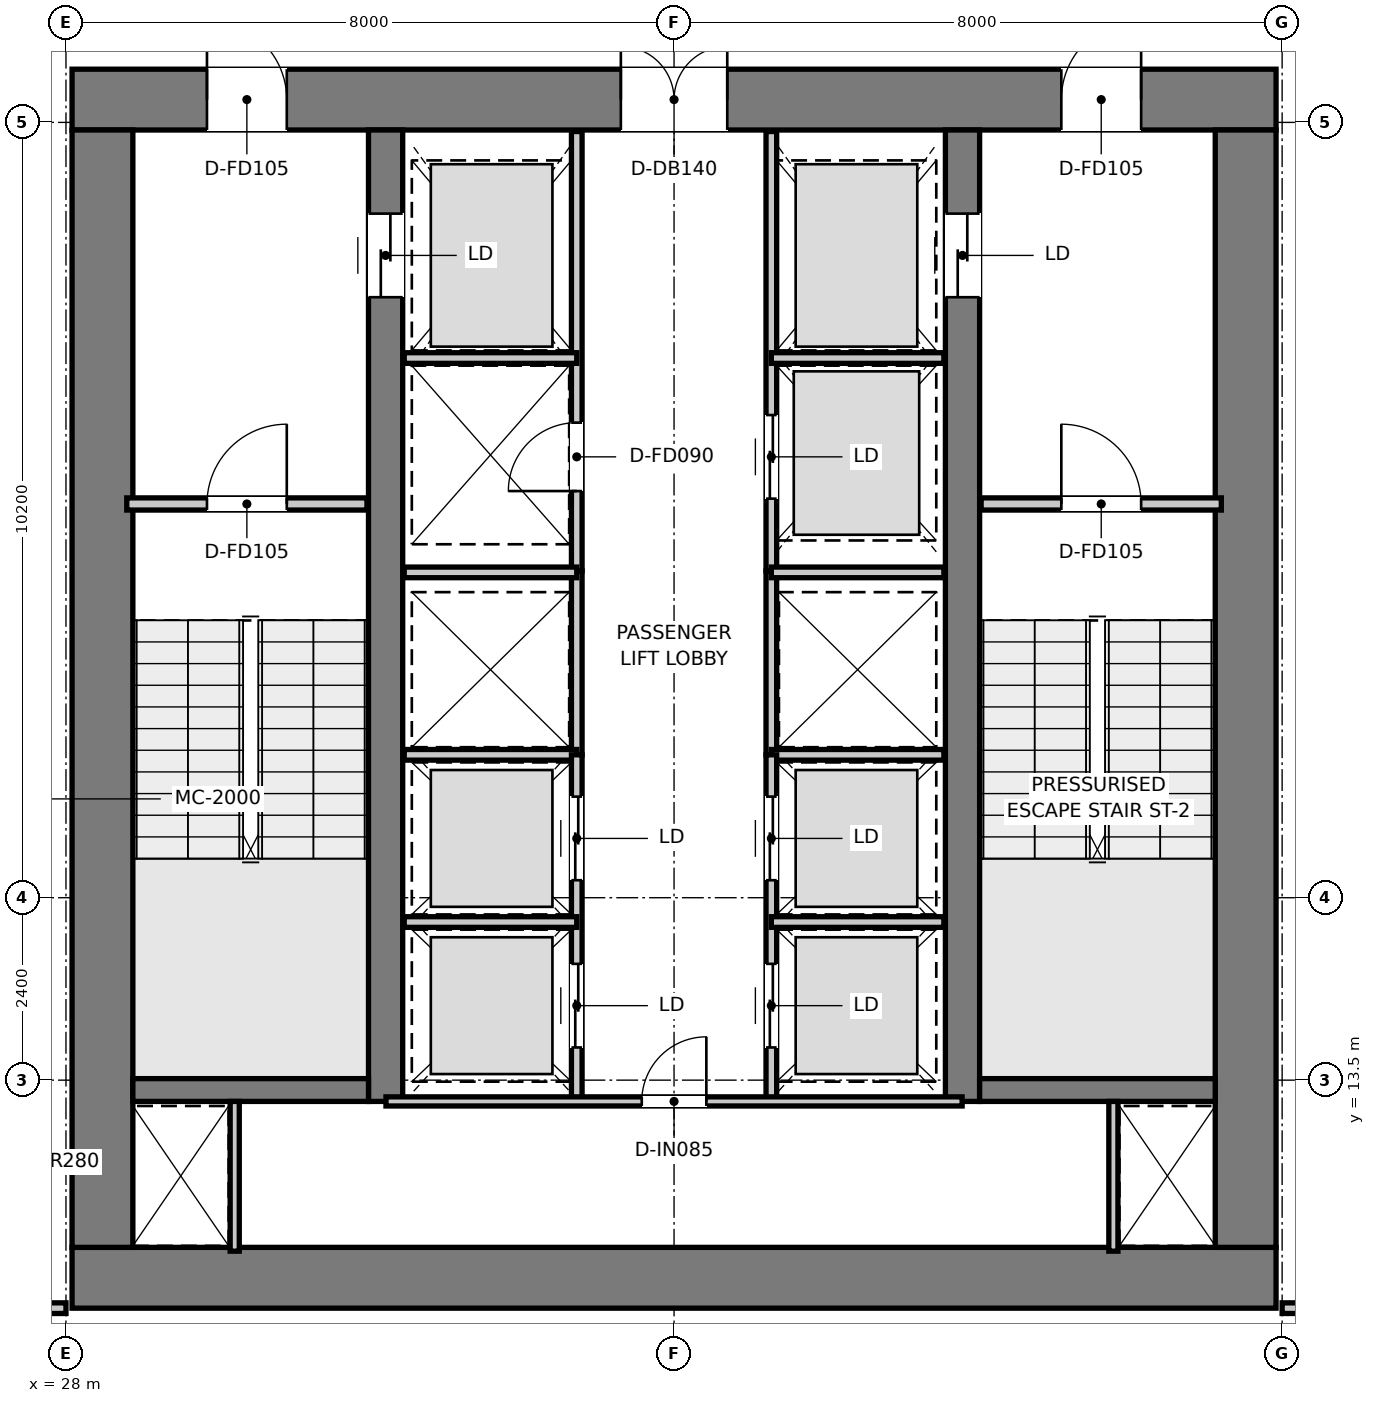
"""IFC4 building model, lengths in metres.
Left out: names, types, materials, properties, quantities, classifications, styles, units other than length and angle.
Written with IfcOpenShell. Run it as: python <this file> out.ifc"""

import sys

from ifc_helpers import new_model, si_unit, direction, frame, frame_2d, origin, place, context, subcontext, project, spatial, rectangle, extrude, element, fill, save


model = new_model("IFC4")
c1 = context("Model", 3, precision=1e-05, world=origin(), true_north=direction((0.0, 1.0)))
c2 = subcontext(c1, "Body", "Model", "MODEL_VIEW")
j1 = project(units=[si_unit("LENGTHUNIT", "METRE"), si_unit("PLANEANGLEUNIT", "RADIAN")], contexts=[c1])
p1 = place(None, origin())
s1 = spatial("IfcSite", under=j1, at=p1, CompositionType="ELEMENT")
p2 = place(p1, origin())
s2 = spatial("IfcBuilding", under=s1, at=p2, CompositionType="ELEMENT")
p3 = place(p2, frame((0.0, 0.0, 86.1)))
s3 = spatial("IfcBuildingStorey", under=s2, at=p3, CompositionType="ELEMENT", Elevation=86.1)
p4 = place(p3, frame((28.08, 10.9, 0.0), z_axis=(0.0, 0.0, 1.0), x_axis=(1.0, 0.0, 0.0)))
e1 = element("IfcWall", 1, at=p4, inside=s3, PredefinedType="SHEAR", context=c2, shape_type="SweptSolid", body=[
    extrude(rectangle(XDim=15.84, YDim=0.8, at=frame_2d((7.92, 0.0))), origin(), (0.0, 0.0, 1.0), 3.95),
])
p5 = place(p3, frame((28.08, 26.4, 0.0), z_axis=(0.0, 0.0, 1.0), x_axis=(1.0, 0.0, 0.0)))
e2 = element("IfcWall", 2, at=p5, inside=s3, PredefinedType="SHEAR", context=c2, shape_type="SweptSolid", body=[
    extrude(rectangle(XDim=15.84, YDim=0.8, at=frame_2d((7.92, 0.0))), origin(), (0.0, 0.0, 1.0), 3.95),
])
p6 = place(p5, frame((7.22, 0.0, 0.0)))
e3 = element("IfcOpeningElement", 3, at=p6, cuts=e2, PredefinedType="OPENING", context=c2, shape_type="SweptSolid", body=[
    extrude(rectangle(XDim=1.4, YDim=2.2, at=frame_2d((0.7, 1.1))), frame((0.0, 0.41, 0.0), z_axis=(0.0, -1.0, 0.0), x_axis=(1.0, 0.0, 0.0)), (0.0, 0.0, 1.0), 0.82),
])
p7 = place(p5, frame((1.775, 0.0, 0.0)))
e4 = element("IfcOpeningElement", 4, at=p7, cuts=e2, PredefinedType="OPENING", context=c2, shape_type="SweptSolid", body=[
    extrude(rectangle(XDim=1.05, YDim=2.1, at=frame_2d((0.525, 1.05))), frame((0.0, 0.41, 0.0), z_axis=(0.0, -1.0, 0.0), x_axis=(1.0, 0.0, 0.0)), (0.0, 0.0, 1.0), 0.82),
])
p8 = place(p5, frame((13.015, 0.0, 0.0)))
e5 = element("IfcOpeningElement", 5, at=p8, cuts=e2, PredefinedType="OPENING", context=c2, shape_type="SweptSolid", body=[
    extrude(rectangle(XDim=1.05, YDim=2.1, at=frame_2d((0.525, 1.05))), frame((0.0, 0.41, 0.0), z_axis=(0.0, -1.0, 0.0), x_axis=(1.0, 0.0, 0.0)), (0.0, 0.0, 1.0), 0.82),
])
for number, where, z_axis, x_axis in (
    (6, (28.48, 11.3, 0.0), (0.0, 0.0, 1.0), (0.0, 1.0, 0.0)),
    (7, (43.52, 11.3, 0.0), (0.0, 0.0, 1.0), (0.0, 1.0, 0.0)),
):
    element("IfcWall", number, at=place(p3, frame(where, z_axis=z_axis, x_axis=x_axis)), inside=s3, PredefinedType="SHEAR", context=c2, shape_type="SweptSolid", body=[
        extrude(rectangle(XDim=14.7, YDim=0.8, at=frame_2d((7.35, 0.0))), origin(), (0.0, 0.0, 1.0), 3.95),
    ])
p9 = place(p3, frame((32.205, 13.22, 0.0), z_axis=(0.0, 0.0, 1.0), x_axis=(0.0, 1.0, 0.0)))
e8 = element("IfcWall", 8, at=p9, inside=s3, PredefinedType="SHEAR", context=c2, shape_type="SweptSolid", body=[
    extrude(rectangle(XDim=12.78, YDim=0.45, at=frame_2d((6.39, 0.0))), origin(), (0.0, 0.0, 1.0), 3.95),
])
p10 = place(p9, frame((10.58, 0.0, 0.0)))
e9 = element("IfcOpeningElement", 9, at=p10, cuts=e8, PredefinedType="OPENING", context=c2, shape_type="SweptSolid", body=[
    extrude(rectangle(XDim=1.1, YDim=2.15, at=frame_2d((0.55, 1.075))), frame((0.0, 0.235, 0.0), z_axis=(0.0, -1.0, 0.0), x_axis=(1.0, 0.0, 0.0)), (0.0, 0.0, 1.0), 0.47),
])
p11 = place(p3, frame((39.795, 13.22, 0.0), z_axis=(0.0, 0.0, 1.0), x_axis=(0.0, 1.0, 0.0)))
e10 = element("IfcWall", 10, at=p11, inside=s3, PredefinedType="SHEAR", context=c2, shape_type="SweptSolid", body=[
    extrude(rectangle(XDim=12.78, YDim=0.45, at=frame_2d((6.39, 0.0))), origin(), (0.0, 0.0, 1.0), 3.95),
])
p12 = place(p11, frame((10.58, 0.0, 0.0)))
e11 = element("IfcOpeningElement", 11, at=p12, cuts=e10, PredefinedType="OPENING", context=c2, shape_type="SweptSolid", body=[
    extrude(rectangle(XDim=1.1, YDim=2.15, at=frame_2d((0.55, 1.075))), frame((0.0, 0.235, 0.0), z_axis=(0.0, -1.0, 0.0), x_axis=(1.0, 0.0, 0.0)), (0.0, 0.0, 1.0), 0.47),
])
for number, where, z_axis, x_axis in (
    (12, (28.88, 13.37, 0.0), (0.0, 0.0, 1.0), (1.0, 0.0, 0.0)),
    (13, (40.02, 13.37, 0.0), (0.0, 0.0, 1.0), (1.0, 0.0, 0.0)),
):
    element("IfcWall", number, at=place(p3, frame(where, z_axis=z_axis, x_axis=x_axis)), inside=s3, PredefinedType="SHEAR", context=c2, shape_type="SweptSolid", body=[
        extrude(rectangle(XDim=3.1, YDim=0.3, at=frame_2d((1.55, 0.0))), origin(), (0.0, 0.0, 1.0), 3.95),
    ])
p13 = place(p3, frame((28.8, 21.08, 0.0), z_axis=(0.0, 0.0, 1.0), x_axis=(1.0, 0.0, 0.0)))
e14 = element("IfcWall", 14, at=p13, inside=s3, PredefinedType="PARTITIONING", context=c2, shape_type="SweptSolid", body=[
    extrude(rectangle(XDim=3.16, YDim=0.16, at=frame_2d((1.58, 0.0))), origin(), (0.0, 0.0, 1.0), 3.67),
])
p14 = place(p13, frame((1.055, 0.0, 0.0)))
e15 = element("IfcOpeningElement", 15, at=p14, cuts=e14, PredefinedType="OPENING", context=c2, shape_type="SweptSolid", body=[
    extrude(rectangle(XDim=1.05, YDim=2.1, at=frame_2d((0.525, 1.05))), frame((0.0, 0.09, 0.0), z_axis=(0.0, -1.0, 0.0), x_axis=(1.0, 0.0, 0.0)), (0.0, 0.0, 1.0), 0.18),
])
p15 = place(p3, frame((40.04, 21.08, 0.0), z_axis=(0.0, 0.0, 1.0), x_axis=(1.0, 0.0, 0.0)))
e16 = element("IfcWall", 16, at=p15, inside=s3, PredefinedType="PARTITIONING", context=c2, shape_type="SweptSolid", body=[
    extrude(rectangle(XDim=3.16, YDim=0.16, at=frame_2d((1.58, 0.0))), origin(), (0.0, 0.0, 1.0), 3.67),
])
p16 = place(p15, frame((1.055, 0.0, 0.0)))
e17 = element("IfcOpeningElement", 17, at=p16, cuts=e16, PredefinedType="OPENING", context=c2, shape_type="SweptSolid", body=[
    extrude(rectangle(XDim=1.05, YDim=2.1, at=frame_2d((0.525, 1.05))), frame((0.0, 0.09, 0.0), z_axis=(0.0, -1.0, 0.0), x_axis=(1.0, 0.0, 0.0)), (0.0, 0.0, 1.0), 0.18),
])
p17 = place(p3, frame((34.72, 20.2, 0.0), z_axis=(0.0, 0.0, 1.0), x_axis=(0.0, 1.0, 0.0)))
e18 = element("IfcWall", 18, at=p17, inside=s3, PredefinedType="PARTITIONING", context=c2, shape_type="SweptSolid", body=[
    extrude(rectangle(XDim=5.78, YDim=0.14, at=frame_2d((2.89, 0.0))), origin(), (0.0, 0.0, 1.0), 2.47),
])
p18 = place(p17, frame((1.05, 0.0, 0.0)))
e19 = element("IfcOpeningElement", 19, at=p18, cuts=e18, PredefinedType="OPENING", context=c2, shape_type="SweptSolid", body=[
    extrude(rectangle(XDim=0.9, YDim=2.1, at=frame_2d((0.45, 1.05))), frame((0.0, 0.08, 0.0), z_axis=(0.0, -1.0, 0.0), x_axis=(1.0, 0.0, 0.0)), (0.0, 0.0, 1.0), 0.16),
])
p19 = place(p3, frame((37.28, 20.2, 0.0), z_axis=(0.0, 0.0, 1.0), x_axis=(0.0, 1.0, 0.0)))
e20 = element("IfcWall", 20, at=p19, inside=s3, PredefinedType="PARTITIONING", context=c2, shape_type="SweptSolid", body=[
    extrude(rectangle(XDim=5.78, YDim=0.14, at=frame_2d((2.89, 0.0))), origin(), (0.0, 0.0, 1.0), 2.47),
])
p20 = place(p19, frame((0.95, 0.0, 0.0)))
e21 = element("IfcOpeningElement", 21, at=p20, cuts=e20, PredefinedType="OPENING", context=c2, shape_type="SweptSolid", body=[
    extrude(rectangle(XDim=1.1, YDim=2.15, at=frame_2d((0.55, 1.075))), frame((0.0, 0.08, 0.0), z_axis=(0.0, -1.0, 0.0), x_axis=(1.0, 0.0, 0.0)), (0.0, 0.0, 1.0), 0.16),
])
for number, where, z_axis, x_axis in (
    (22, (32.45, 23.0, 0.0), (0.0, 0.0, 1.0), (1.0, 0.0, 0.0)),
    (23, (37.28, 23.0, 0.0), (0.0, 0.0, 1.0), (1.0, 0.0, 0.0)),
):
    element("IfcWall", number, at=place(p3, frame(where, z_axis=z_axis, x_axis=x_axis)), inside=s3, PredefinedType="PARTITIONING", context=c2, shape_type="SweptSolid", body=[
        extrude(rectangle(XDim=2.27, YDim=0.14, at=frame_2d((1.135, 0.0))), origin(), (0.0, 0.0, 1.0), 2.47),
    ])
for number, where, z_axis, x_axis in (
    (24, (34.72, 17.78, 0.0), (0.0, 0.0, 1.0), (0.0, 1.0, 0.0)),
    (25, (37.28, 17.78, 0.0), (0.0, 0.0, 1.0), (0.0, 1.0, 0.0)),
):
    element("IfcWall", number, at=place(p3, frame(where, z_axis=z_axis, x_axis=x_axis)), inside=s3, PredefinedType="PARTITIONING", context=c2, shape_type="SweptSolid", body=[
        extrude(rectangle(XDim=2.42, YDim=0.14, at=frame_2d((1.21, 0.0))), origin(), (0.0, 0.0, 1.0), 3.67),
    ])
for number, where, z_axis, x_axis in (
    (26, (32.45, 17.78, 0.0), (0.0, 0.0, 1.0), (1.0, 0.0, 0.0)),
    (27, (32.45, 20.18, 0.0), (0.0, 0.0, 1.0), (1.0, 0.0, 0.0)),
    (28, (37.28, 17.78, 0.0), (0.0, 0.0, 1.0), (1.0, 0.0, 0.0)),
    (29, (37.28, 20.18, 0.0), (0.0, 0.0, 1.0), (1.0, 0.0, 0.0)),
):
    element("IfcWall", number, at=place(p3, frame(where, z_axis=z_axis, x_axis=x_axis)), inside=s3, PredefinedType="PARTITIONING", context=c2, shape_type="SweptSolid", body=[
        extrude(rectangle(XDim=2.27, YDim=0.14, at=frame_2d((1.135, 0.0))), origin(), (0.0, 0.0, 1.0), 3.67),
    ])
p21 = place(p3, frame((34.72, 13.22, 0.0), z_axis=(0.0, 0.0, 1.0), x_axis=(0.0, 1.0, 0.0)))
e30 = element("IfcWall", 30, at=p21, inside=s3, PredefinedType="PARTITIONING", context=c2, shape_type="SweptSolid", body=[
    extrude(rectangle(XDim=4.56, YDim=0.14, at=frame_2d((2.28, 0.0))), origin(), (0.0, 0.0, 1.0), 3.67),
])
p22 = place(p21, frame((0.71, 0.0, 0.0)))
e31 = element("IfcOpeningElement", 31, at=p22, cuts=e30, PredefinedType="OPENING", context=c2, shape_type="SweptSolid", body=[
    extrude(rectangle(XDim=1.1, YDim=2.15, at=frame_2d((0.55, 1.075))), frame((0.0, 0.08, 0.0), z_axis=(0.0, -1.0, 0.0), x_axis=(1.0, 0.0, 0.0)), (0.0, 0.0, 1.0), 0.16),
])
p23 = place(p21, frame((2.91, 0.0, 0.0)))
e32 = element("IfcOpeningElement", 32, at=p23, cuts=e30, PredefinedType="OPENING", context=c2, shape_type="SweptSolid", body=[
    extrude(rectangle(XDim=1.1, YDim=2.15, at=frame_2d((0.55, 1.075))), frame((0.0, 0.08, 0.0), z_axis=(0.0, -1.0, 0.0), x_axis=(1.0, 0.0, 0.0)), (0.0, 0.0, 1.0), 0.16),
])
p24 = place(p3, frame((32.45, 15.58, 0.0), z_axis=(0.0, 0.0, 1.0), x_axis=(1.0, 0.0, 0.0)))
e33 = element("IfcWall", 33, at=p24, inside=s3, PredefinedType="PARTITIONING", context=c2, shape_type="SweptSolid", body=[
    extrude(rectangle(XDim=2.27, YDim=0.14, at=frame_2d((1.135, 0.0))), origin(), (0.0, 0.0, 1.0), 3.67),
])
p25 = place(p3, frame((37.28, 13.22, 0.0), z_axis=(0.0, 0.0, 1.0), x_axis=(0.0, 1.0, 0.0)))
e34 = element("IfcWall", 34, at=p25, inside=s3, PredefinedType="PARTITIONING", context=c2, shape_type="SweptSolid", body=[
    extrude(rectangle(XDim=4.56, YDim=0.14, at=frame_2d((2.28, 0.0))), origin(), (0.0, 0.0, 1.0), 3.67),
])
p26 = place(p25, frame((0.71, 0.0, 0.0)))
e35 = element("IfcOpeningElement", 35, at=p26, cuts=e34, PredefinedType="OPENING", context=c2, shape_type="SweptSolid", body=[
    extrude(rectangle(XDim=1.1, YDim=2.15, at=frame_2d((0.55, 1.075))), frame((0.0, 0.08, 0.0), z_axis=(0.0, -1.0, 0.0), x_axis=(1.0, 0.0, 0.0)), (0.0, 0.0, 1.0), 0.16),
])
p27 = place(p25, frame((2.91, 0.0, 0.0)))
e36 = element("IfcOpeningElement", 36, at=p27, cuts=e34, PredefinedType="OPENING", context=c2, shape_type="SweptSolid", body=[
    extrude(rectangle(XDim=1.1, YDim=2.15, at=frame_2d((0.55, 1.075))), frame((0.0, 0.08, 0.0), z_axis=(0.0, -1.0, 0.0), x_axis=(1.0, 0.0, 0.0)), (0.0, 0.0, 1.0), 0.16),
])
p28 = place(p3, frame((37.28, 15.58, 0.0), z_axis=(0.0, 0.0, 1.0), x_axis=(1.0, 0.0, 0.0)))
e37 = element("IfcWall", 37, at=p28, inside=s3, PredefinedType="PARTITIONING", context=c2, shape_type="SweptSolid", body=[
    extrude(rectangle(XDim=2.27, YDim=0.14, at=frame_2d((1.135, 0.0))), origin(), (0.0, 0.0, 1.0), 3.67),
])
for number, where, z_axis, x_axis in (
    (38, (30.22, 11.25, 0.0), (0.0, 0.0, 1.0), (0.0, 1.0, 0.0)),
    (39, (41.78, 11.25, 0.0), (0.0, 0.0, 1.0), (0.0, 1.0, 0.0)),
):
    element("IfcWall", number, at=place(p3, frame(where, z_axis=z_axis, x_axis=x_axis)), inside=s3, PredefinedType="PARTITIONING", context=c2, shape_type="SweptSolid", body=[
        extrude(rectangle(XDim=1.97, YDim=0.12, at=frame_2d((0.985, 0.0))), origin(), (0.0, 0.0, 1.0), 3.67),
    ])
p29 = place(p3, frame((32.21, 13.22, 0.0), z_axis=(0.0, 0.0, 1.0), x_axis=(1.0, 0.0, 0.0)))
e40 = element("IfcWall", 40, at=p29, inside=s3, PredefinedType="PARTITIONING", context=c2, shape_type="SweptSolid", body=[
    extrude(rectangle(XDim=7.58, YDim=0.12, at=frame_2d((3.79, 0.0))), origin(), (0.0, 0.0, 1.0), 3.67),
])
p30 = place(p29, frame((3.365, 0.0, 0.0)))
e41 = element("IfcOpeningElement", 41, at=p30, cuts=e40, PredefinedType="OPENING", context=c2, shape_type="SweptSolid", body=[
    extrude(rectangle(XDim=0.85, YDim=2.1, at=frame_2d((0.425, 1.05))), frame((0.0, 0.07, 0.0), z_axis=(0.0, -1.0, 0.0), x_axis=(1.0, 0.0, 0.0)), (0.0, 0.0, 1.0), 0.14),
])
p31 = place(p3, frame((26.32, 10.5, 0.0), z_axis=(0.0, 0.0, 1.0), x_axis=(1.0, 0.0, 0.0)))
e42 = element("IfcWall", 42, at=p31, inside=s3, PredefinedType="PARTITIONING", context=c2, shape_type="SweptSolid", body=[
    extrude(rectangle(XDim=1.68, YDim=0.14, at=frame_2d((0.84, 0.0))), origin(), (0.0, 0.0, 1.0), 3.67),
])
p32 = place(p31, frame((0.445, 0.0, 0.0)))
e43 = element("IfcOpeningElement", 43, at=p32, cuts=e42, PredefinedType="OPENING", context=c2, shape_type="SweptSolid", body=[
    extrude(rectangle(XDim=0.85, YDim=2.1, at=frame_2d((0.425, 1.05))), frame((0.0, 0.08, 0.0), z_axis=(0.0, -1.0, 0.0), x_axis=(1.0, 0.0, 0.0)), (0.0, 0.0, 1.0), 0.16),
])
p33 = place(p3, frame((44.0, 10.5, 0.0), z_axis=(0.0, 0.0, 1.0), x_axis=(1.0, 0.0, 0.0)))
e44 = element("IfcWall", 44, at=p33, inside=s3, PredefinedType="PARTITIONING", context=c2, shape_type="SweptSolid", body=[
    extrude(rectangle(XDim=1.68, YDim=0.14, at=frame_2d((0.84, 0.0))), origin(), (0.0, 0.0, 1.0), 3.67),
])
p34 = place(p14, origin())
e45 = element("IfcDoor", 45, at=p34, inside=s3, OperationType="SINGLE_SWING_RIGHT", PredefinedType="DOOR", context=c2, shape_type="SweptSolid", body=[
    extrude(rectangle(XDim=1.05, YDim=2.1, at=frame_2d((0.525, 1.05))), frame((0.0, 0.025, 0.0), z_axis=(0.0, -1.0, 0.0), x_axis=(1.0, 0.0, 0.0)), (0.0, 0.0, 1.0), 0.05),
])
fill(e15, e45)
p35 = place(p16, origin())
e46 = element("IfcDoor", 46, at=p35, inside=s3, OperationType="SINGLE_SWING_LEFT", PredefinedType="DOOR", context=c2, shape_type="SweptSolid", body=[
    extrude(rectangle(XDim=1.05, YDim=2.1, at=frame_2d((0.525, 1.05))), frame((0.0, 0.025, 0.0), z_axis=(0.0, -1.0, 0.0), x_axis=(1.0, 0.0, 0.0)), (0.0, 0.0, 1.0), 0.05),
])
fill(e17, e46)
p36 = place(p6, origin())
e47 = element("IfcDoor", 47, at=p36, inside=s3, OperationType="DOUBLE_DOOR_SINGLE_SWING", PredefinedType="DOOR", context=c2, shape_type="SweptSolid", body=[
    extrude(rectangle(XDim=1.4, YDim=2.2, at=frame_2d((0.7, 1.1))), frame((0.0, 0.025, 0.0), z_axis=(0.0, -1.0, 0.0), x_axis=(1.0, 0.0, 0.0)), (0.0, 0.0, 1.0), 0.05),
])
fill(e3, e47)
p37 = place(p7, origin())
e48 = element("IfcDoor", 48, at=p37, inside=s3, OperationType="SINGLE_SWING_LEFT", PredefinedType="DOOR", context=c2, shape_type="SweptSolid", body=[
    extrude(rectangle(XDim=1.05, YDim=2.1, at=frame_2d((0.525, 1.05))), frame((0.0, 0.025, 0.0), z_axis=(0.0, -1.0, 0.0), x_axis=(1.0, 0.0, 0.0)), (0.0, 0.0, 1.0), 0.05),
])
fill(e4, e48)
p38 = place(p8, origin())
e49 = element("IfcDoor", 49, at=p38, inside=s3, OperationType="SINGLE_SWING_RIGHT", PredefinedType="DOOR", context=c2, shape_type="SweptSolid", body=[
    extrude(rectangle(XDim=1.05, YDim=2.1, at=frame_2d((0.525, 1.05))), frame((0.0, 0.025, 0.0), z_axis=(0.0, -1.0, 0.0), x_axis=(1.0, 0.0, 0.0)), (0.0, 0.0, 1.0), 0.05),
])
fill(e5, e49)
p39 = place(p10, origin())
e50 = element("IfcDoor", 50, at=p39, inside=s3, OperationType="DOUBLE_DOOR_SLIDING", PredefinedType="DOOR", context=c2, shape_type="SweptSolid", body=[
    extrude(rectangle(XDim=1.1, YDim=2.15, at=frame_2d((0.55, 1.075))), frame((0.0, 0.025, 0.0), z_axis=(0.0, -1.0, 0.0), x_axis=(1.0, 0.0, 0.0)), (0.0, 0.0, 1.0), 0.05),
])
fill(e9, e50)
p40 = place(p12, origin())
e51 = element("IfcDoor", 51, at=p40, inside=s3, OperationType="DOUBLE_DOOR_SLIDING", PredefinedType="DOOR", context=c2, shape_type="SweptSolid", body=[
    extrude(rectangle(XDim=1.1, YDim=2.15, at=frame_2d((0.55, 1.075))), frame((0.0, 0.025, 0.0), z_axis=(0.0, -1.0, 0.0), x_axis=(1.0, 0.0, 0.0)), (0.0, 0.0, 1.0), 0.05),
])
fill(e11, e51)
p41 = place(p18, origin())
e52 = element("IfcDoor", 52, at=p41, inside=s3, OperationType="SINGLE_SWING_LEFT", PredefinedType="DOOR", context=c2, shape_type="SweptSolid", body=[
    extrude(rectangle(XDim=0.9, YDim=2.1, at=frame_2d((0.45, 1.05))), frame((0.0, 0.025, 0.0), z_axis=(0.0, -1.0, 0.0), x_axis=(1.0, 0.0, 0.0)), (0.0, 0.0, 1.0), 0.05),
])
fill(e19, e52)
p42 = place(p20, origin())
e53 = element("IfcDoor", 53, at=p42, inside=s3, OperationType="DOUBLE_DOOR_SLIDING", PredefinedType="DOOR", context=c2, shape_type="SweptSolid", body=[
    extrude(rectangle(XDim=1.1, YDim=2.15, at=frame_2d((0.55, 1.075))), frame((0.0, 0.025, 0.0), z_axis=(0.0, -1.0, 0.0), x_axis=(1.0, 0.0, 0.0)), (0.0, 0.0, 1.0), 0.05),
])
fill(e21, e53)
p43 = place(p22, origin())
e54 = element("IfcDoor", 54, at=p43, inside=s3, OperationType="DOUBLE_DOOR_SLIDING", PredefinedType="DOOR", context=c2, shape_type="SweptSolid", body=[
    extrude(rectangle(XDim=1.1, YDim=2.15, at=frame_2d((0.55, 1.075))), frame((0.0, 0.025, 0.0), z_axis=(0.0, -1.0, 0.0), x_axis=(1.0, 0.0, 0.0)), (0.0, 0.0, 1.0), 0.05),
])
fill(e31, e54)
p44 = place(p23, origin())
e55 = element("IfcDoor", 55, at=p44, inside=s3, OperationType="DOUBLE_DOOR_SLIDING", PredefinedType="DOOR", context=c2, shape_type="SweptSolid", body=[
    extrude(rectangle(XDim=1.1, YDim=2.15, at=frame_2d((0.55, 1.075))), frame((0.0, 0.025, 0.0), z_axis=(0.0, -1.0, 0.0), x_axis=(1.0, 0.0, 0.0)), (0.0, 0.0, 1.0), 0.05),
])
fill(e32, e55)
p45 = place(p26, origin())
e56 = element("IfcDoor", 56, at=p45, inside=s3, OperationType="DOUBLE_DOOR_SLIDING", PredefinedType="DOOR", context=c2, shape_type="SweptSolid", body=[
    extrude(rectangle(XDim=1.1, YDim=2.15, at=frame_2d((0.55, 1.075))), frame((0.0, 0.025, 0.0), z_axis=(0.0, -1.0, 0.0), x_axis=(1.0, 0.0, 0.0)), (0.0, 0.0, 1.0), 0.05),
])
fill(e35, e56)
p46 = place(p27, origin())
e57 = element("IfcDoor", 57, at=p46, inside=s3, OperationType="DOUBLE_DOOR_SLIDING", PredefinedType="DOOR", context=c2, shape_type="SweptSolid", body=[
    extrude(rectangle(XDim=1.1, YDim=2.15, at=frame_2d((0.55, 1.075))), frame((0.0, 0.025, 0.0), z_axis=(0.0, -1.0, 0.0), x_axis=(1.0, 0.0, 0.0)), (0.0, 0.0, 1.0), 0.05),
])
fill(e36, e57)
p47 = place(p30, origin())
e58 = element("IfcDoor", 58, at=p47, inside=s3, OperationType="SINGLE_SWING_RIGHT", PredefinedType="DOOR", context=c2, shape_type="SweptSolid", body=[
    extrude(rectangle(XDim=0.85, YDim=2.1, at=frame_2d((0.425, 1.05))), frame((0.0, 0.025, 0.0), z_axis=(0.0, -1.0, 0.0), x_axis=(1.0, 0.0, 0.0)), (0.0, 0.0, 1.0), 0.05),
])
fill(e41, e58)
save(model, sys.argv[1])
